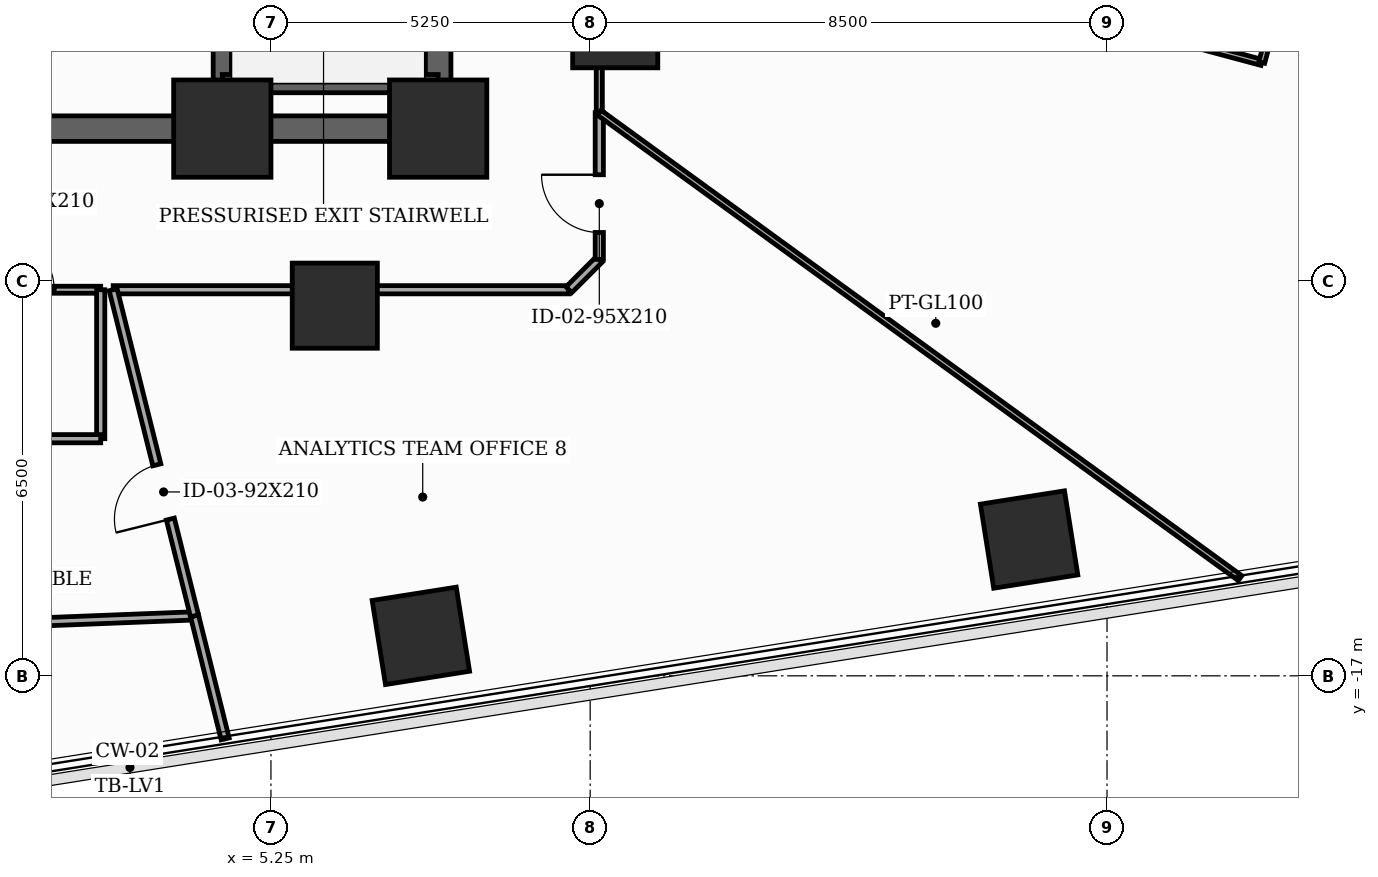
"""IFC4 building model, lengths in metres.
Left out: names, types, materials, properties, quantities, classifications, styles, units other than length and angle.
Written with IfcOpenShell. Run it as: python <this file> out.ifc"""

import sys

from ifc_helpers import new_model, si_unit, direction, frame, frame_2d, origin, origin_2d, place, context, subcontext, project, spatial, rectangle, extrude, element, fill, save


model = new_model("IFC4")
c1 = context("Model", 3, precision=1e-05, world=origin(), true_north=direction((0.0, 1.0)))
c2 = subcontext(c1, "Body", "Model", "MODEL_VIEW")
j1 = project(units=[si_unit("LENGTHUNIT", "METRE"), si_unit("PLANEANGLEUNIT", "RADIAN")], contexts=[c1])
p1 = place(None, origin())
s1 = spatial("IfcSite", under=j1, at=p1, CompositionType="ELEMENT")
p2 = place(p1, origin())
s2 = spatial("IfcBuilding", under=s1, at=p2, CompositionType="ELEMENT")
p3 = place(p2, frame((0.0, 0.0, 55.6)))
s3 = spatial("IfcBuildingStorey", under=s2, at=p3, CompositionType="ELEMENT", Elevation=55.6)
for number, where, z_axis, x_axis in (
    (1, (4.45, -8.0, 0.0), (0.0, 0.0, 1.0), (1.0, 0.0, 0.0)),
    (2, (8.0, -8.0, 0.0), (0.0, 0.0, 1.0), (1.0, 0.0, 0.0)),
):
    element("IfcColumn", number, at=place(p3, frame(where, z_axis=z_axis, x_axis=x_axis)), inside=s3, PredefinedType="COLUMN", context=c2, shape_type="SweptSolid", body=[
        extrude(rectangle(XDim=1.6, YDim=1.6, at=origin_2d()), origin(), (0.0, 0.0, 1.0), 3.7),
    ])
for number, where, z_axis, x_axis in (
    (3, (6.3, -10.912, 0.0), (0.0, 0.0, 1.0), (1.0, 0.0, 0.0)),
    (4, (10.912, -6.3, 0.0), (0.0, 0.0, 1.0), (1.0, 0.0, 0.0)),
    (5, (7.716, -16.343, 0.0), (0.0, 0.0, 1.0), (0.988, 0.156, 0.0)),
    (6, (17.719, -14.758, 0.0), (0.0, 0.0, 1.0), (0.988, 0.156, 0.0)),
):
    element("IfcColumn", number, at=place(p3, frame(where, z_axis=z_axis, x_axis=x_axis)), inside=s3, PredefinedType="COLUMN", context=c2, shape_type="SweptSolid", body=[
        extrude(rectangle(XDim=1.4, YDim=1.4, at=origin_2d()), origin(), (0.0, 0.0, 1.0), 3.7),
    ])
p4 = place(p3, frame((8.0, -8.0, 0.0), z_axis=(0.0, 0.0, 1.0), x_axis=(0.0, 1.0, 0.0)))
e7 = element("IfcWall", 7, at=p4, inside=s3, PredefinedType="SHEAR", context=c2, shape_type="SweptSolid", body=[
    extrude(rectangle(XDim=16.0, YDim=0.42, at=frame_2d((8.0, 0.0))), origin(), (0.0, 0.0, 1.0), 3.5),
])
p5 = place(p4, frame((9.6, 0.0, 0.0)))
e8 = element("IfcOpeningElement", 8, at=p5, cuts=e7, PredefinedType="OPENING", context=c2, shape_type="SweptSolid", body=[
    extrude(rectangle(XDim=1.05, YDim=2.15, at=frame_2d((0.525, 1.075))), frame((0.0, 0.22, 0.0), z_axis=(0.0, -1.0, 0.0), x_axis=(1.0, 0.0, 0.0)), (0.0, 0.0, 1.0), 0.44),
])
p6 = place(p4, frame((14.148, 0.0, 0.0)))
e9 = element("IfcOpeningElement", 9, at=p6, cuts=e7, PredefinedType="OPENING", context=c2, shape_type="SweptSolid", body=[
    extrude(rectangle(XDim=0.85, YDim=2.02, at=frame_2d((0.425, 1.01))), frame((0.0, 0.22, 0.0), z_axis=(0.0, -1.0, 0.0), x_axis=(1.0, 0.0, 0.0)), (0.0, 0.0, 1.0), 0.44),
])
p7 = place(p3, frame((-8.0, -8.0, 0.0), z_axis=(0.0, 0.0, 1.0), x_axis=(1.0, 0.0, 0.0)))
e10 = element("IfcWall", 10, at=p7, inside=s3, PredefinedType="SHEAR", context=c2, shape_type="SweptSolid", body=[
    extrude(rectangle(XDim=16.0, YDim=0.42, at=frame_2d((8.0, 0.0))), origin(), (0.0, 0.0, 1.0), 3.5),
])
p8 = place(p7, frame((7.52, 0.0, 0.0)))
e11 = element("IfcOpeningElement", 11, at=p8, cuts=e10, PredefinedType="OPENING", context=c2, shape_type="SweptSolid", body=[
    extrude(rectangle(XDim=0.95, YDim=2.1, at=frame_2d((0.475, 1.05))), frame((0.0, 0.22, 0.0), z_axis=(0.0, -1.0, 0.0), x_axis=(1.0, 0.0, 0.0)), (0.0, 0.0, 1.0), 0.44),
])
p9 = place(p3, frame((4.45, -7.79, 0.0), z_axis=(0.0, 0.0, 1.0), x_axis=(0.0, 1.0, 0.0)))
e12 = element("IfcWall", 12, at=p9, inside=s3, PredefinedType="SHEAR", context=c2, shape_type="SweptSolid", body=[
    extrude(rectangle(XDim=15.58, YDim=0.3, at=frame_2d((7.79, 0.0))), origin(), (0.0, 0.0, 1.0), 3.5),
])
p10 = place(p3, frame((4.45, -7.26, 0.0), z_axis=(0.0, 0.0, 1.0), x_axis=(1.0, 0.0, 0.0)))
e13 = element("IfcWall", 13, at=p10, inside=s3, PredefinedType="SHEAR", context=c2, shape_type="SweptSolid", body=[
    extrude(rectangle(XDim=3.55, YDim=0.3, at=frame_2d((1.775, 0.0))), origin(), (0.0, 0.0, 1.0), 3.5),
])
p11 = place(p3, frame((10.65, -7.738, 0.0), z_axis=(0.0, 0.0, 1.0), x_axis=(0.0, 1.0, 0.0)))
e14 = element("IfcWall", 14, at=p11, inside=s3, PredefinedType="MOVABLE", context=c2, shape_type="SweptSolid", body=[
    extrude(rectangle(XDim=3.746, YDim=0.1, at=frame_2d((1.873, 0.0))), origin(), (0.0, 0.0, 1.0), 2.785),
])
p12 = place(p3, frame((10.65, -3.992, 0.0), z_axis=(0.0, 0.0, 1.0), x_axis=(0.965906888357, -0.258889712088, 0.0)))
e15 = element("IfcWall", 15, at=p12, inside=s3, PredefinedType="MOVABLE", context=c2, shape_type="SweptSolid", body=[
    extrude(rectangle(XDim=11.28, YDim=0.1, at=frame_2d((5.64, 0.0))), origin(), (0.0, 0.0, 1.0), 2.785),
])
p13 = place(p3, frame((21.545, -6.912, 0.0), z_axis=(0.0, 0.0, 1.0), x_axis=(0.259105843213, 0.965848933329, 0.0)))
e16 = element("IfcWall", 16, at=p13, inside=s3, PredefinedType="MOVABLE", context=c2, shape_type="SweptSolid", body=[
    extrude(rectangle(XDim=2.2, YDim=0.1, at=frame_2d((1.1, 0.0))), origin(), (0.0, 0.0, 1.0), 3.5),
])
p14 = place(p3, frame((0.0, -10.65, 0.0), z_axis=(0.0, 0.0, 1.0), x_axis=(1.0, 0.0, 0.0)))
e17 = element("IfcWall", 17, at=p14, inside=s3, PredefinedType="PARTITIONING", context=c2, shape_type="SweptSolid", body=[
    extrude(rectangle(XDim=2.45, YDim=0.115, at=frame_2d((1.225, 0.0))), origin(), (0.0, 0.0, 1.0), 3.5),
])
p15 = place(p14, frame((0.765, 0.0, 0.0)))
e18 = element("IfcOpeningElement", 18, at=p15, cuts=e17, PredefinedType="OPENING", context=c2, shape_type="SweptSolid", body=[
    extrude(rectangle(XDim=0.92, YDim=2.1, at=frame_2d((0.46, 1.05))), frame((0.0, 0.067, 0.0), z_axis=(0.0, -1.0, 0.0), x_axis=(1.0, 0.0, 0.0)), (0.0, 0.0, 1.0), 0.135),
])
p16 = place(p3, frame((2.655, -10.65, 0.0), z_axis=(0.0, 0.0, 1.0), x_axis=(1.0, 0.0, 0.0)))
e19 = element("IfcWall", 19, at=p16, inside=s3, PredefinedType="PARTITIONING", context=c2, shape_type="SweptSolid", body=[
    extrude(rectangle(XDim=7.495, YDim=0.135, at=frame_2d((3.748, 0.0))), origin(), (0.0, 0.0, 1.0), 2.785),
])
p17 = place(p3, frame((10.15, -10.65, 0.0), z_axis=(0.0, 0.0, 1.0), x_axis=(0.707106781187, 0.707106781187, 0.0)))
e20 = element("IfcWall", 20, at=p17, inside=s3, PredefinedType="PARTITIONING", context=c2, shape_type="SweptSolid", body=[
    extrude(rectangle(XDim=0.707, YDim=0.135, at=frame_2d((0.354, 0.0))), origin(), (0.0, 0.0, 1.0), 3.5),
])
p18 = place(p3, frame((10.65, -10.15, 0.0), z_axis=(0.0, 0.0, 1.0), x_axis=(0.0, 1.0, 0.0)))
e21 = element("IfcWall", 21, at=p18, inside=s3, PredefinedType="PARTITIONING", context=c2, shape_type="SweptSolid", body=[
    extrude(rectangle(XDim=2.412, YDim=0.135, at=frame_2d((1.206, 0.0))), origin(), (0.0, 0.0, 1.0), 3.5),
])
p19 = place(p18, frame((0.442, 0.0, 0.0)))
e22 = element("IfcOpeningElement", 22, at=p19, cuts=e21, PredefinedType="OPENING", context=c2, shape_type="SweptSolid", body=[
    extrude(rectangle(XDim=0.95, YDim=2.1, at=frame_2d((0.475, 1.05))), frame((0.0, 0.077, 0.0), z_axis=(0.0, -1.0, 0.0), x_axis=(1.0, 0.0, 0.0)), (0.0, 0.0, 1.0), 0.155),
])
p20 = place(p3, frame((10.65, -7.738, 0.0), z_axis=(0.0, 0.0, 1.0), x_axis=(0.809048025811, -0.587742538814, 0.0)))
e23 = element("IfcWall", 23, at=p20, inside=s3, PredefinedType="MOVABLE", context=c2, shape_type="SweptSolid", body=[
    extrude(rectangle(XDim=13.025, YDim=0.1, at=frame_2d((6.513, 0.0))), origin(), (0.0, 0.0, 1.0), 2.785),
])
p21 = place(p3, frame((3.993, -16.014, 0.0), z_axis=(0.0, 0.0, 1.0), x_axis=(-0.999230720769, -0.039216918185, 0.0)))
e24 = element("IfcWall", 24, at=p21, inside=s3, PredefinedType="PARTITIONING", context=c2, shape_type="SweptSolid", body=[
    extrude(rectangle(XDim=7.166, YDim=0.135, at=frame_2d((3.583, 0.0))), origin(), (0.0, 0.0, 1.0), 2.785),
])
p22 = place(p3, frame((4.497, -18.037, 0.0), z_axis=(0.0, 0.0, 1.0), x_axis=(-0.24157117672, 0.970383102995, 0.0)))
e25 = element("IfcWall", 25, at=p22, inside=s3, PredefinedType="PARTITIONING", context=c2, shape_type="SweptSolid", body=[
    extrude(rectangle(XDim=2.085, YDim=0.135, at=frame_2d((1.042, 0.0))), origin(), (0.0, 0.0, 1.0), 2.935),
])
p23 = place(p3, frame((2.45, -10.65, 0.0), z_axis=(0.0, 0.0, 1.0), x_axis=(0.0, -1.0, 0.0)))
e26 = element("IfcWall", 26, at=p23, inside=s3, PredefinedType="PARTITIONING", context=c2, shape_type="SweptSolid", body=[
    extrude(rectangle(XDim=2.45, YDim=0.135, at=frame_2d((1.225, 0.0))), origin(), (0.0, 0.0, 1.0), 2.785),
])
p24 = place(p3, frame((2.45, -13.1, 0.0), z_axis=(0.0, 0.0, 1.0), x_axis=(-1.0, 0.0, 0.0)))
e27 = element("IfcWall", 27, at=p24, inside=s3, PredefinedType="PARTITIONING", context=c2, shape_type="SweptSolid", body=[
    extrude(rectangle(XDim=2.45, YDim=0.135, at=frame_2d((1.225, 0.0))), origin(), (0.0, 0.0, 1.0), 2.785),
])
p25 = place(p3, frame((3.993, -16.014, 0.0), z_axis=(0.0, 0.0, 1.0), x_axis=(-0.242005649473, 0.97027484025, 0.0)))
e28 = element("IfcWall", 28, at=p25, inside=s3, PredefinedType="PARTITIONING", context=c2, shape_type="SweptSolid", body=[
    extrude(rectangle(XDim=5.528, YDim=0.135, at=frame_2d((2.764, 0.0))), origin(), (0.0, 0.0, 1.0), 2.785),
])
p26 = place(p25, frame((1.641, 0.0, 0.0)))
e29 = element("IfcOpeningElement", 29, at=p26, cuts=e28, PredefinedType="OPENING", context=c2, shape_type="SweptSolid", body=[
    extrude(rectangle(XDim=0.92, YDim=2.1, at=frame_2d((0.46, 1.05))), frame((0.0, 0.077, 0.0), z_axis=(0.0, -1.0, 0.0), x_axis=(1.0, 0.0, 0.0)), (0.0, 0.0, 1.0), 0.155),
])
p27 = place(p15, origin())
e30 = element("IfcDoor", 30, at=p27, inside=s3, OperationType="SINGLE_SWING_LEFT", PredefinedType="DOOR", context=c2, shape_type="SweptSolid", body=[
    extrude(rectangle(XDim=0.92, YDim=2.1, at=frame_2d((0.46, 1.05))), frame((0.0, 0.025, 0.0), z_axis=(0.0, -1.0, 0.0), x_axis=(1.0, 0.0, 0.0)), (0.0, 0.0, 1.0), 0.05),
])
fill(e18, e30)
p28 = place(p19, origin())
e31 = element("IfcDoor", 31, at=p28, inside=s3, OperationType="SINGLE_SWING_RIGHT", PredefinedType="DOOR", context=c2, shape_type="SweptSolid", body=[
    extrude(rectangle(XDim=0.95, YDim=2.1, at=frame_2d((0.475, 1.05))), frame((0.0, 0.025, 0.0), z_axis=(0.0, -1.0, 0.0), x_axis=(1.0, 0.0, 0.0)), (0.0, 0.0, 1.0), 0.05),
])
fill(e22, e31)
p29 = place(p26, origin())
e32 = element("IfcDoor", 32, at=p29, inside=s3, OperationType="SINGLE_SWING_LEFT", PredefinedType="DOOR", context=c2, shape_type="SweptSolid", body=[
    extrude(rectangle(XDim=0.92, YDim=2.1, at=frame_2d((0.46, 1.05))), frame((0.0, 0.025, 0.0), z_axis=(0.0, -1.0, 0.0), x_axis=(1.0, 0.0, 0.0)), (0.0, 0.0, 1.0), 0.05),
])
fill(e29, e32)
save(model, sys.argv[1])
